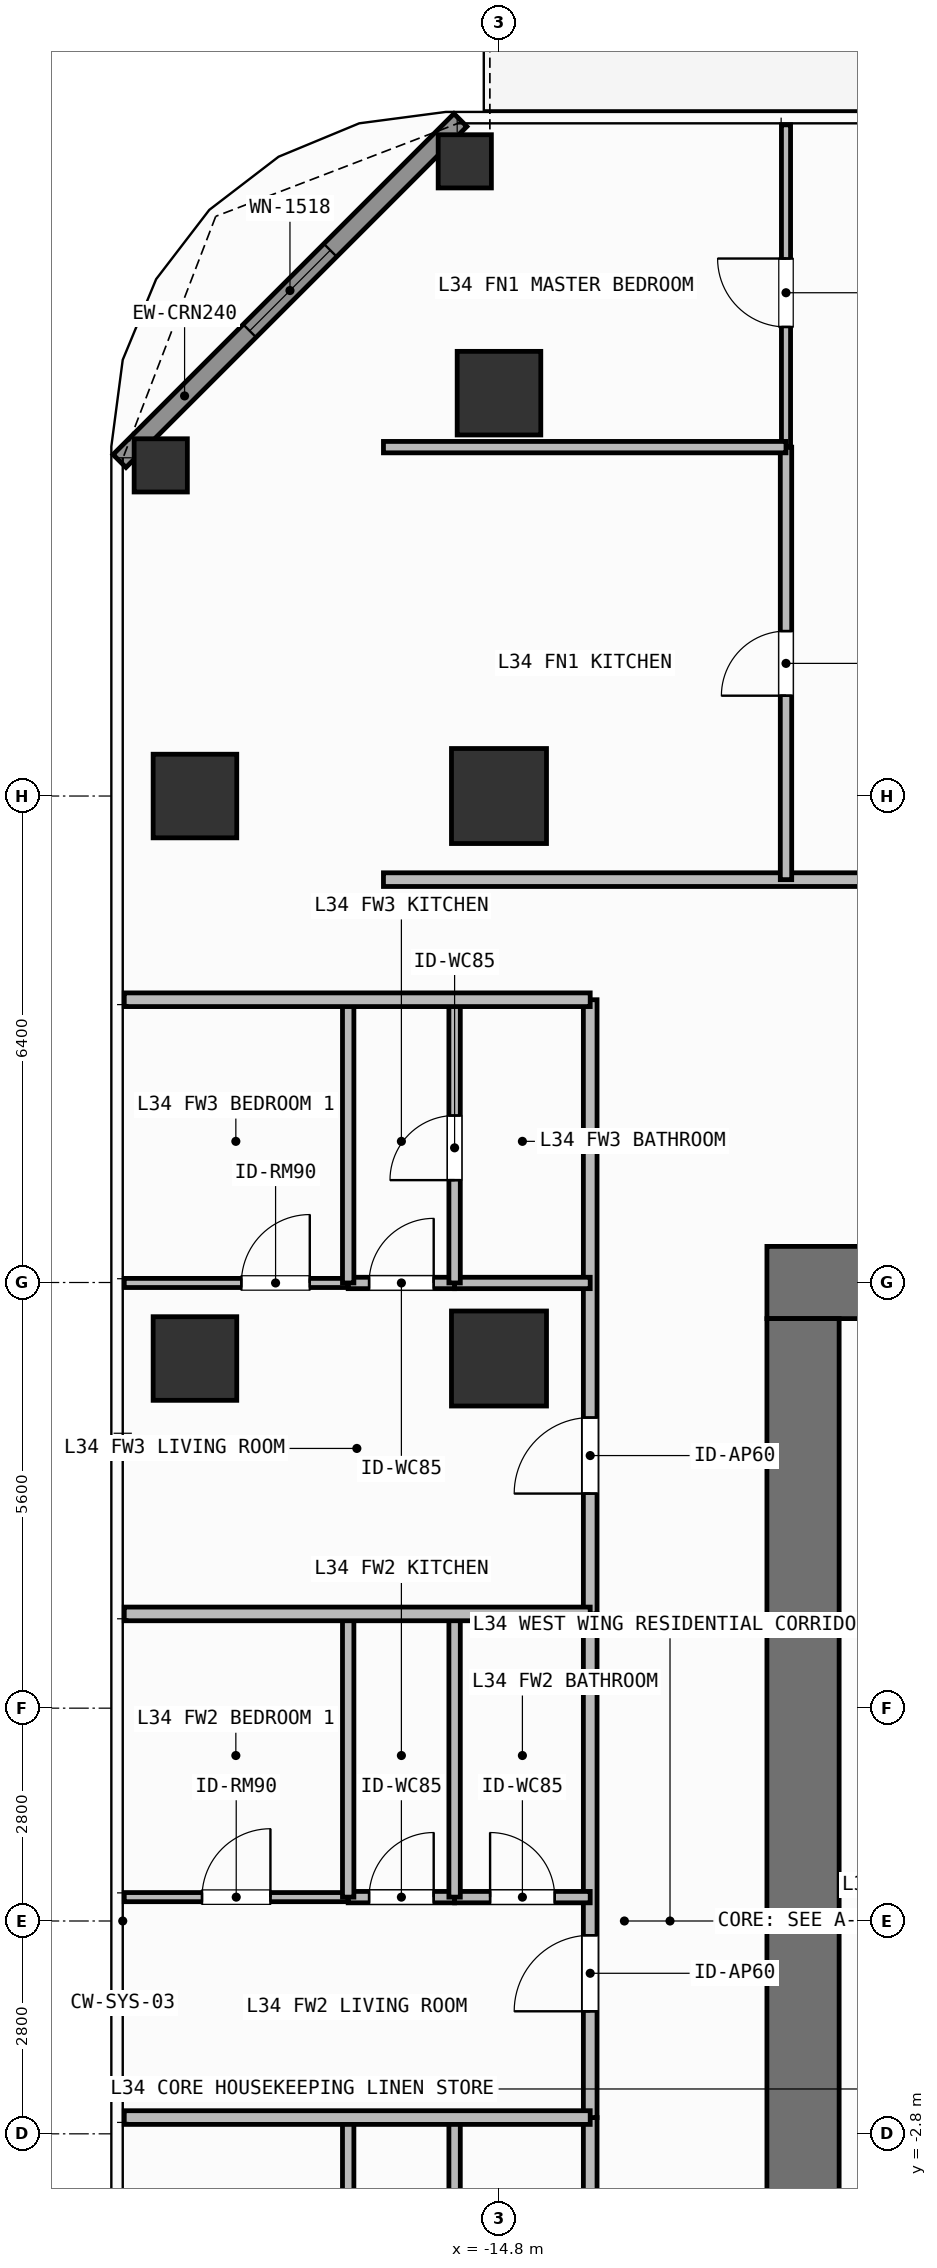
"""IFC4 building model, lengths in metres.
Left out: names, types, materials, properties, quantities, classifications, styles, units other than length and angle.
Written with IfcOpenShell. Run it as: python <this file> out.ifc"""

import sys

from ifc_helpers import new_model, si_unit, direction, frame, frame_2d, origin, origin_2d, place, context, subcontext, project, spatial, rectangle, hollow_rectangle, extrude, element, fill, save


model = new_model("IFC4")
c1 = context("Model", 3, precision=1e-05, world=origin(), true_north=direction((0.0, 1.0)))
c2 = subcontext(c1, "Body", "Model", "MODEL_VIEW")
j1 = project(units=[si_unit("LENGTHUNIT", "METRE"), si_unit("PLANEANGLEUNIT", "RADIAN")], contexts=[c1])
p1 = place(None, origin())
s1 = spatial("IfcSite", under=j1, at=p1, CompositionType="ELEMENT")
p2 = place(p1, origin())
s2 = spatial("IfcBuilding", under=s1, at=p2, CompositionType="ELEMENT")
p3 = place(p2, frame((0.0, 0.0, 136.8)))
s3 = spatial("IfcBuildingStorey", under=s2, at=p3, CompositionType="ELEMENT", Elevation=136.8)
p4 = place(p3, frame((-11.275, 8.4, 0.0), z_axis=(0.0, 0.0, 1.0), x_axis=(1.0, 0.0, 0.0)))
e1 = element("IfcWall", 1, at=p4, inside=s3, PredefinedType="SHEAR", context=c2, shape_type="SweptSolid", body=[
    extrude(rectangle(XDim=1.575, YDim=0.95, at=frame_2d((0.788, 0.0))), origin(), (0.0, 0.0, 1.0), 3.9),
])
p5 = place(p3, frame((-10.8, -7.925, 0.0), z_axis=(0.0, 0.0, 1.0), x_axis=(0.0, 1.0, 0.0)))
e2 = element("IfcWall", 2, at=p5, inside=s3, PredefinedType="SHEAR", context=c2, shape_type="SweptSolid", body=[
    extrude(rectangle(XDim=15.85, YDim=0.95, at=frame_2d((7.925, 0.0))), origin(), (0.0, 0.0, 1.0), 3.9),
])
for number, where, z_axis, x_axis in (
    (3, (-14.8, 14.8, 0.0), (0.0, 0.0, 1.0), (1.0, 0.0, 0.0)),
    (4, (-14.8, 7.4, 0.0), (0.0, 0.0, 1.0), (1.0, 0.0, 0.0)),
):
    element("IfcColumn", number, at=place(p3, frame(where, z_axis=z_axis, x_axis=x_axis)), inside=s3, PredefinedType="COLUMN", context=c2, shape_type="SweptSolid", body=[
        extrude(rectangle(XDim=1.25, YDim=1.25, at=origin_2d()), origin(), (0.0, 0.0, 1.0), 3.9),
    ])
for number, where, z_axis, x_axis in (
    (5, (-18.8, 7.4, 0.0), (0.0, 0.0, 1.0), (1.0, 0.0, 0.0)),
    (6, (-18.8, 14.8, 0.0), (0.0, 0.0, 1.0), (1.0, 0.0, 0.0)),
    (7, (-14.8, 20.1, 0.0), (0.0, 0.0, 1.0), (1.0, 0.0, 0.0)),
):
    element("IfcColumn", number, at=place(p3, frame(where, z_axis=z_axis, x_axis=x_axis)), inside=s3, PredefinedType="COLUMN", context=c2, shape_type="SweptSolid", body=[
        extrude(rectangle(XDim=1.1, YDim=1.1, at=origin_2d()), origin(), (0.0, 0.0, 1.0), 3.9),
    ])
for number, where, z_axis, x_axis in (
    (8, (-15.25, 23.15, 0.0), (0.0, 0.0, 1.0), (1.0, 0.0, 0.0)),
    (9, (-19.25, 19.15, 0.0), (0.0, 0.0, 1.0), (1.0, 0.0, 0.0)),
):
    element("IfcColumn", number, at=place(p3, frame(where, z_axis=z_axis, x_axis=x_axis)), inside=s3, PredefinedType="COLUMN", context=c2, shape_type="SweptSolid", body=[
        extrude(hollow_rectangle(XDim=0.7, YDim=0.7, WallThickness=0.032, at=origin_2d()), origin(), (0.0, 0.0, 1.0), 3.9),
    ])
p6 = place(p3, frame((-19.792, 19.208, 0.0), z_axis=(0.0, 0.0, 1.0), x_axis=(0.707106781187, 0.707106781187, 0.0)))
e10 = element("IfcWall", 10, at=p6, inside=s3, PredefinedType="SOLIDWALL", context=c2, shape_type="SweptSolid", body=[
    extrude(rectangle(XDim=6.343, YDim=0.24, at=frame_2d((3.171, 0.0))), origin(), (0.0, 0.0, 1.0), 3.68),
])
p7 = place(p6, frame((2.421, 0.0, 0.8)))
e11 = element("IfcOpeningElement", 11, at=p7, cuts=e10, PredefinedType="OPENING", context=c2, shape_type="SweptSolid", body=[
    extrude(rectangle(XDim=1.5, YDim=1.85, at=frame_2d((0.75, 0.925))), frame((0.0, 0.13, 0.0), z_axis=(0.0, -1.0, 0.0), x_axis=(1.0, 0.0, 0.0)), (0.0, 0.0, 1.0), 0.26),
])
p8 = place(p3, frame((-16.32, 13.7, 0.0), z_axis=(0.0, 0.0, 1.0), x_axis=(1.0, 0.0, 0.0)))
e12 = element("IfcWall", 12, at=p8, inside=s3, PredefinedType="PARTITIONING", context=c2, shape_type="SweptSolid", body=[
    extrude(rectangle(XDim=17.524, YDim=0.18, at=frame_2d((8.762, 0.0))), origin(), (0.0, 0.0, 1.0), 3.68),
])
p9 = place(p8, frame((7.104, 0.0, 0.0)))
e13 = element("IfcOpeningElement", 13, at=p9, cuts=e12, PredefinedType="OPENING", context=c2, shape_type="SweptSolid", body=[
    extrude(rectangle(XDim=1.0, YDim=2.2, at=frame_2d((0.5, 1.1))), frame((0.0, 0.1, 0.0), z_axis=(0.0, -1.0, 0.0), x_axis=(1.0, 0.0, 0.0)), (0.0, 0.0, 1.0), 0.2),
])
p10 = place(p3, frame((-11.024, 13.7, 0.0), z_axis=(0.0, 0.0, 1.0), x_axis=(0.0, 1.0, 0.0)))
e14 = element("IfcWall", 14, at=p10, inside=s3, PredefinedType="PARTITIONING", context=c2, shape_type="SweptSolid", body=[
    extrude(rectangle(XDim=5.69, YDim=0.15, at=frame_2d((2.845, 0.0))), origin(), (0.0, 0.0, 1.0), 3.68),
])
p11 = place(p10, frame((2.42, 0.0, 0.0)))
e15 = element("IfcOpeningElement", 15, at=p11, cuts=e14, PredefinedType="OPENING", context=c2, shape_type="SweptSolid", body=[
    extrude(rectangle(XDim=0.85, YDim=2.1, at=frame_2d((0.425, 1.05))), frame((0.0, 0.085, 0.0), z_axis=(0.0, -1.0, 0.0), x_axis=(1.0, 0.0, 0.0)), (0.0, 0.0, 1.0), 0.17),
])
p12 = place(p3, frame((-11.024, 19.39, 0.0), z_axis=(0.0, 0.0, 1.0), x_axis=(0.0, 1.0, 0.0)))
e16 = element("IfcWall", 16, at=p12, inside=s3, PredefinedType="PARTITIONING", context=c2, shape_type="SweptSolid", body=[
    extrude(rectangle(XDim=4.24, YDim=0.12, at=frame_2d((2.12, 0.0))), origin(), (0.0, 0.0, 1.0), 3.37),
])
p13 = place(p12, frame((1.581, 0.0, 0.0)))
e17 = element("IfcOpeningElement", 17, at=p13, cuts=e16, PredefinedType="OPENING", context=c2, shape_type="SweptSolid", body=[
    extrude(rectangle(XDim=0.9, YDim=2.1, at=frame_2d((0.45, 1.05))), frame((0.0, 0.07, 0.0), z_axis=(0.0, -1.0, 0.0), x_axis=(1.0, 0.0, 0.0)), (0.0, 0.0, 1.0), 0.14),
])
p14 = place(p3, frame((-13.6, -12.12, 0.0), z_axis=(0.0, 0.0, 1.0), x_axis=(0.0, 1.0, 0.0)))
e18 = element("IfcWall", 18, at=p14, inside=s3, PredefinedType="PARTITIONING", context=c2, shape_type="SweptSolid", body=[
    extrude(rectangle(XDim=9.534, YDim=0.18, at=frame_2d((4.767, 0.0))), origin(), (0.0, 0.0, 1.0), 3.68),
])
p15 = place(p14, frame((1.41, 0.0, 0.0)))
e19 = element("IfcOpeningElement", 19, at=p15, cuts=e18, PredefinedType="OPENING", context=c2, shape_type="SweptSolid", body=[
    extrude(rectangle(XDim=1.0, YDim=2.2, at=frame_2d((0.5, 1.1))), frame((0.0, 0.1, 0.0), z_axis=(0.0, -1.0, 0.0), x_axis=(1.0, 0.0, 0.0)), (0.0, 0.0, 1.0), 0.2),
])
p16 = place(p3, frame((-13.6, -2.586, 0.0), z_axis=(0.0, 0.0, 1.0), x_axis=(0.0, 1.0, 0.0)))
e20 = element("IfcWall", 20, at=p16, inside=s3, PredefinedType="PARTITIONING", context=c2, shape_type="SweptSolid", body=[
    extrude(rectangle(XDim=6.626, YDim=0.18, at=frame_2d((3.313, 0.0))), origin(), (0.0, 0.0, 1.0), 3.68),
])
p17 = place(p16, frame((1.398, 0.0, 0.0)))
e21 = element("IfcOpeningElement", 21, at=p17, cuts=e20, PredefinedType="OPENING", context=c2, shape_type="SweptSolid", body=[
    extrude(rectangle(XDim=1.0, YDim=2.2, at=frame_2d((0.5, 1.1))), frame((0.0, 0.1, 0.0), z_axis=(0.0, -1.0, 0.0), x_axis=(1.0, 0.0, 0.0)), (0.0, 0.0, 1.0), 0.2),
])
p18 = place(p3, frame((-16.784, 0.314, 0.0), z_axis=(0.0, 0.0, 1.0), x_axis=(1.0, 0.0, 0.0)))
e22 = element("IfcWall", 22, at=p18, inside=s3, PredefinedType="PARTITIONING", context=c2, shape_type="SweptSolid", body=[
    extrude(rectangle(XDim=1.4, YDim=0.15, at=frame_2d((0.7, 0.0))), origin(), (0.0, 0.0, 1.0), 3.68),
])
p19 = place(p18, frame((0.275, 0.0, 0.0)))
e23 = element("IfcOpeningElement", 23, at=p19, cuts=e22, PredefinedType="OPENING", context=c2, shape_type="SweptSolid", body=[
    extrude(rectangle(XDim=0.85, YDim=2.1, at=frame_2d((0.425, 1.05))), frame((0.0, 0.085, 0.0), z_axis=(0.0, -1.0, 0.0), x_axis=(1.0, 0.0, 0.0)), (0.0, 0.0, 1.0), 0.17),
])
p20 = place(p3, frame((-15.384, 0.314, 0.0), z_axis=(0.0, 0.0, 1.0), x_axis=(1.0, 0.0, 0.0)))
e24 = element("IfcWall", 24, at=p20, inside=s3, PredefinedType="PARTITIONING", context=c2, shape_type="SweptSolid", body=[
    extrude(rectangle(XDim=1.784, YDim=0.15, at=frame_2d((0.892, 0.0))), origin(), (0.0, 0.0, 1.0), 3.68),
])
p21 = place(p20, frame((0.467, 0.0, 0.0)))
e25 = element("IfcOpeningElement", 25, at=p21, cuts=e24, PredefinedType="OPENING", context=c2, shape_type="SweptSolid", body=[
    extrude(rectangle(XDim=0.85, YDim=2.1, at=frame_2d((0.425, 1.05))), frame((0.0, 0.085, 0.0), z_axis=(0.0, -1.0, 0.0), x_axis=(1.0, 0.0, 0.0)), (0.0, 0.0, 1.0), 0.17),
])
p22 = place(p3, frame((-19.73, 0.314, 0.0), z_axis=(0.0, 0.0, 1.0), x_axis=(1.0, 0.0, 0.0)))
e26 = element("IfcWall", 26, at=p22, inside=s3, PredefinedType="PARTITIONING", context=c2, shape_type="SweptSolid", body=[
    extrude(rectangle(XDim=2.946, YDim=0.12, at=frame_2d((1.473, 0.0))), origin(), (0.0, 0.0, 1.0), 3.68),
])
p23 = place(p22, frame((1.023, 0.0, 0.0)))
e27 = element("IfcOpeningElement", 27, at=p23, cuts=e26, PredefinedType="OPENING", context=c2, shape_type="SweptSolid", body=[
    extrude(rectangle(XDim=0.9, YDim=2.1, at=frame_2d((0.45, 1.05))), frame((0.0, 0.07, 0.0), z_axis=(0.0, -1.0, 0.0), x_axis=(1.0, 0.0, 0.0)), (0.0, 0.0, 1.0), 0.14),
])
p24 = place(p3, frame((-13.6, 4.04, 0.0), z_axis=(0.0, 0.0, 1.0), x_axis=(0.0, 1.0, 0.0)))
e28 = element("IfcWall", 28, at=p24, inside=s3, PredefinedType="PARTITIONING", context=c2, shape_type="SweptSolid", body=[
    extrude(rectangle(XDim=8.08, YDim=0.18, at=frame_2d((4.04, 0.0))), origin(), (0.0, 0.0, 1.0), 3.68),
])
p25 = place(p24, frame((1.583, 0.0, 0.0)))
e29 = element("IfcOpeningElement", 29, at=p25, cuts=e28, PredefinedType="OPENING", context=c2, shape_type="SweptSolid", body=[
    extrude(rectangle(XDim=1.0, YDim=2.2, at=frame_2d((0.5, 1.1))), frame((0.0, 0.1, 0.0), z_axis=(0.0, -1.0, 0.0), x_axis=(1.0, 0.0, 0.0)), (0.0, 0.0, 1.0), 0.2),
])
p26 = place(p3, frame((-16.784, 8.394, 0.0), z_axis=(0.0, 0.0, 1.0), x_axis=(1.0, 0.0, 0.0)))
e30 = element("IfcWall", 30, at=p26, inside=s3, PredefinedType="PARTITIONING", context=c2, shape_type="SweptSolid", body=[
    extrude(rectangle(XDim=1.4, YDim=0.15, at=frame_2d((0.7, 0.0))), origin(), (0.0, 0.0, 1.0), 3.68),
])
p27 = place(p26, frame((0.275, 0.0, 0.0)))
e31 = element("IfcOpeningElement", 31, at=p27, cuts=e30, PredefinedType="OPENING", context=c2, shape_type="SweptSolid", body=[
    extrude(rectangle(XDim=0.85, YDim=2.1, at=frame_2d((0.425, 1.05))), frame((0.0, 0.085, 0.0), z_axis=(0.0, -1.0, 0.0), x_axis=(1.0, 0.0, 0.0)), (0.0, 0.0, 1.0), 0.17),
])
p28 = place(p3, frame((-15.384, 8.394, 0.0), z_axis=(0.0, 0.0, 1.0), x_axis=(1.0, 0.0, 0.0)))
e32 = element("IfcWall", 32, at=p28, inside=s3, PredefinedType="PARTITIONING", context=c2, shape_type="SweptSolid", body=[
    extrude(rectangle(XDim=1.784, YDim=0.15, at=frame_2d((0.892, 0.0))), origin(), (0.0, 0.0, 1.0), 3.68),
])
p29 = place(p3, frame((-19.73, 8.394, 0.0), z_axis=(0.0, 0.0, 1.0), x_axis=(1.0, 0.0, 0.0)))
e33 = element("IfcWall", 33, at=p29, inside=s3, PredefinedType="PARTITIONING", context=c2, shape_type="SweptSolid", body=[
    extrude(rectangle(XDim=2.946, YDim=0.12, at=frame_2d((1.473, 0.0))), origin(), (0.0, 0.0, 1.0), 3.68),
])
p30 = place(p29, frame((1.541, 0.0, 0.0)))
e34 = element("IfcOpeningElement", 34, at=p30, cuts=e33, PredefinedType="OPENING", context=c2, shape_type="SweptSolid", body=[
    extrude(rectangle(XDim=0.9, YDim=2.1, at=frame_2d((0.45, 1.05))), frame((0.0, 0.07, 0.0), z_axis=(0.0, -1.0, 0.0), x_axis=(1.0, 0.0, 0.0)), (0.0, 0.0, 1.0), 0.14),
])
p31 = place(p3, frame((-16.32, 19.39, 0.0), z_axis=(0.0, 0.0, 1.0), x_axis=(1.0, 0.0, 0.0)))
e35 = element("IfcWall", 35, at=p31, inside=s3, PredefinedType="PARTITIONING", context=c2, shape_type="SweptSolid", body=[
    extrude(rectangle(XDim=5.296, YDim=0.15, at=frame_2d((2.648, 0.0))), origin(), (0.0, 0.0, 1.0), 3.68),
])
for number, where, z_axis, x_axis in (
    (36, (-15.384, -9.32, 0.0), (0.0, 0.0, 1.0), (0.0, 1.0, 0.0)),
    (37, (-16.784, -9.32, 0.0), (0.0, 0.0, 1.0), (0.0, 1.0, 0.0)),
):
    element("IfcWall", number, at=place(p3, frame(where, z_axis=z_axis, x_axis=x_axis)), inside=s3, PredefinedType="PARTITIONING", context=c2, shape_type="SweptSolid", body=[
        extrude(rectangle(XDim=6.734, YDim=0.15, at=frame_2d((3.367, 0.0))), origin(), (0.0, 0.0, 1.0), 3.68),
    ])
for number, where, z_axis, x_axis in (
    (38, (-15.384, 0.314, 0.0), (0.0, 0.0, 1.0), (0.0, 1.0, 0.0)),
    (39, (-16.784, 0.314, 0.0), (0.0, 0.0, 1.0), (0.0, 1.0, 0.0)),
):
    element("IfcWall", number, at=place(p3, frame(where, z_axis=z_axis, x_axis=x_axis)), inside=s3, PredefinedType="PARTITIONING", context=c2, shape_type="SweptSolid", body=[
        extrude(rectangle(XDim=3.726, YDim=0.15, at=frame_2d((1.863, 0.0))), origin(), (0.0, 0.0, 1.0), 3.68),
    ])
p32 = place(p3, frame((-19.73, -2.586, 0.0), z_axis=(0.0, 0.0, 1.0), x_axis=(1.0, 0.0, 0.0)))
e40 = element("IfcWall", 40, at=p32, inside=s3, PredefinedType="PARTITIONING", context=c2, shape_type="SweptSolid", body=[
    extrude(rectangle(XDim=6.13, YDim=0.18, at=frame_2d((3.065, 0.0))), origin(), (0.0, 0.0, 1.0), 3.68),
])
p33 = place(p3, frame((-15.384, 8.394, 0.0), z_axis=(0.0, 0.0, 1.0), x_axis=(0.0, 1.0, 0.0)))
e41 = element("IfcWall", 41, at=p33, inside=s3, PredefinedType="PARTITIONING", context=c2, shape_type="SweptSolid", body=[
    extrude(rectangle(XDim=3.726, YDim=0.15, at=frame_2d((1.863, 0.0))), origin(), (0.0, 0.0, 1.0), 3.68),
])
p34 = place(p33, frame((1.353, 0.0, 0.0)))
e42 = element("IfcOpeningElement", 42, at=p34, cuts=e41, PredefinedType="OPENING", context=c2, shape_type="SweptSolid", body=[
    extrude(rectangle(XDim=0.85, YDim=2.1, at=frame_2d((0.425, 1.05))), frame((0.0, 0.085, 0.0), z_axis=(0.0, -1.0, 0.0), x_axis=(1.0, 0.0, 0.0)), (0.0, 0.0, 1.0), 0.17),
])
p35 = place(p3, frame((-16.784, 8.394, 0.0), z_axis=(0.0, 0.0, 1.0), x_axis=(0.0, 1.0, 0.0)))
e43 = element("IfcWall", 43, at=p35, inside=s3, PredefinedType="PARTITIONING", context=c2, shape_type="SweptSolid", body=[
    extrude(rectangle(XDim=3.726, YDim=0.15, at=frame_2d((1.863, 0.0))), origin(), (0.0, 0.0, 1.0), 3.68),
])
for number, where, z_axis, x_axis in (
    (44, (-19.73, 4.04, 0.0), (0.0, 0.0, 1.0), (1.0, 0.0, 0.0)),
    (45, (-19.73, 12.12, 0.0), (0.0, 0.0, 1.0), (1.0, 0.0, 0.0)),
):
    element("IfcWall", number, at=place(p3, frame(where, z_axis=z_axis, x_axis=x_axis)), inside=s3, PredefinedType="PARTITIONING", context=c2, shape_type="SweptSolid", body=[
        extrude(rectangle(XDim=6.13, YDim=0.18, at=frame_2d((3.065, 0.0))), origin(), (0.0, 0.0, 1.0), 3.68),
    ])
p36 = place(p7, origin())
e46 = element("IfcWindow", 46, at=p36, inside=s3, PartitioningType="SINGLE_PANEL", PredefinedType="WINDOW", context=c2, shape_type="SweptSolid", body=[
    extrude(rectangle(XDim=1.5, YDim=1.85, at=frame_2d((0.75, 0.925))), frame((0.0, 0.03, 0.0), z_axis=(0.0, -1.0, 0.0), x_axis=(1.0, 0.0, 0.0)), (0.0, 0.0, 1.0), 0.06),
])
fill(e11, e46)
p37 = place(p11, origin())
e47 = element("IfcDoor", 47, at=p37, inside=s3, OperationType="SINGLE_SWING_LEFT", PredefinedType="DOOR", context=c2, shape_type="SweptSolid", body=[
    extrude(rectangle(XDim=0.85, YDim=2.1, at=frame_2d((0.425, 1.05))), frame((0.0, 0.025, 0.0), z_axis=(0.0, -1.0, 0.0), x_axis=(1.0, 0.0, 0.0)), (0.0, 0.0, 1.0), 0.05),
])
fill(e15, e47)
p38 = place(p13, origin())
e48 = element("IfcDoor", 48, at=p38, inside=s3, OperationType="SINGLE_SWING_RIGHT", PredefinedType="DOOR", context=c2, shape_type="SweptSolid", body=[
    extrude(rectangle(XDim=0.9, YDim=2.1, at=frame_2d((0.45, 1.05))), frame((0.0, 0.025, 0.0), z_axis=(0.0, -1.0, 0.0), x_axis=(1.0, 0.0, 0.0)), (0.0, 0.0, 1.0), 0.05),
])
fill(e17, e48)
p39 = place(p17, origin())
e49 = element("IfcDoor", 49, at=p39, inside=s3, OperationType="SINGLE_SWING_LEFT", PredefinedType="DOOR", context=c2, shape_type="SweptSolid", body=[
    extrude(rectangle(XDim=1.0, YDim=2.2, at=frame_2d((0.5, 1.1))), frame((0.0, 0.025, 0.0), z_axis=(0.0, -1.0, 0.0), x_axis=(1.0, 0.0, 0.0)), (0.0, 0.0, 1.0), 0.05),
])
fill(e21, e49)
p40 = place(p19, origin())
e50 = element("IfcDoor", 50, at=p40, inside=s3, OperationType="SINGLE_SWING_RIGHT", PredefinedType="DOOR", context=c2, shape_type="SweptSolid", body=[
    extrude(rectangle(XDim=0.85, YDim=2.1, at=frame_2d((0.425, 1.05))), frame((0.0, 0.025, 0.0), z_axis=(0.0, -1.0, 0.0), x_axis=(1.0, 0.0, 0.0)), (0.0, 0.0, 1.0), 0.05),
])
fill(e23, e50)
p41 = place(p21, origin())
e51 = element("IfcDoor", 51, at=p41, inside=s3, OperationType="SINGLE_SWING_LEFT", PredefinedType="DOOR", context=c2, shape_type="SweptSolid", body=[
    extrude(rectangle(XDim=0.85, YDim=2.1, at=frame_2d((0.425, 1.05))), frame((0.0, 0.025, 0.0), z_axis=(0.0, -1.0, 0.0), x_axis=(1.0, 0.0, 0.0)), (0.0, 0.0, 1.0), 0.05),
])
fill(e25, e51)
p42 = place(p23, origin())
e52 = element("IfcDoor", 52, at=p42, inside=s3, OperationType="SINGLE_SWING_RIGHT", PredefinedType="DOOR", context=c2, shape_type="SweptSolid", body=[
    extrude(rectangle(XDim=0.9, YDim=2.1, at=frame_2d((0.45, 1.05))), frame((0.0, 0.025, 0.0), z_axis=(0.0, -1.0, 0.0), x_axis=(1.0, 0.0, 0.0)), (0.0, 0.0, 1.0), 0.05),
])
fill(e27, e52)
p43 = place(p25, origin())
e53 = element("IfcDoor", 53, at=p43, inside=s3, OperationType="SINGLE_SWING_LEFT", PredefinedType="DOOR", context=c2, shape_type="SweptSolid", body=[
    extrude(rectangle(XDim=1.0, YDim=2.2, at=frame_2d((0.5, 1.1))), frame((0.0, 0.025, 0.0), z_axis=(0.0, -1.0, 0.0), x_axis=(1.0, 0.0, 0.0)), (0.0, 0.0, 1.0), 0.05),
])
fill(e29, e53)
p44 = place(p27, origin())
e54 = element("IfcDoor", 54, at=p44, inside=s3, OperationType="SINGLE_SWING_RIGHT", PredefinedType="DOOR", context=c2, shape_type="SweptSolid", body=[
    extrude(rectangle(XDim=0.85, YDim=2.1, at=frame_2d((0.425, 1.05))), frame((0.0, 0.025, 0.0), z_axis=(0.0, -1.0, 0.0), x_axis=(1.0, 0.0, 0.0)), (0.0, 0.0, 1.0), 0.05),
])
fill(e31, e54)
p45 = place(p34, origin())
e55 = element("IfcDoor", 55, at=p45, inside=s3, OperationType="SINGLE_SWING_LEFT", PredefinedType="DOOR", context=c2, shape_type="SweptSolid", body=[
    extrude(rectangle(XDim=0.85, YDim=2.1, at=frame_2d((0.425, 1.05))), frame((0.0, 0.025, 0.0), z_axis=(0.0, -1.0, 0.0), x_axis=(1.0, 0.0, 0.0)), (0.0, 0.0, 1.0), 0.05),
])
fill(e42, e55)
p46 = place(p30, origin())
e56 = element("IfcDoor", 56, at=p46, inside=s3, OperationType="SINGLE_SWING_RIGHT", PredefinedType="DOOR", context=c2, shape_type="SweptSolid", body=[
    extrude(rectangle(XDim=0.9, YDim=2.1, at=frame_2d((0.45, 1.05))), frame((0.0, 0.025, 0.0), z_axis=(0.0, -1.0, 0.0), x_axis=(1.0, 0.0, 0.0)), (0.0, 0.0, 1.0), 0.05),
])
fill(e34, e56)
save(model, sys.argv[1])
